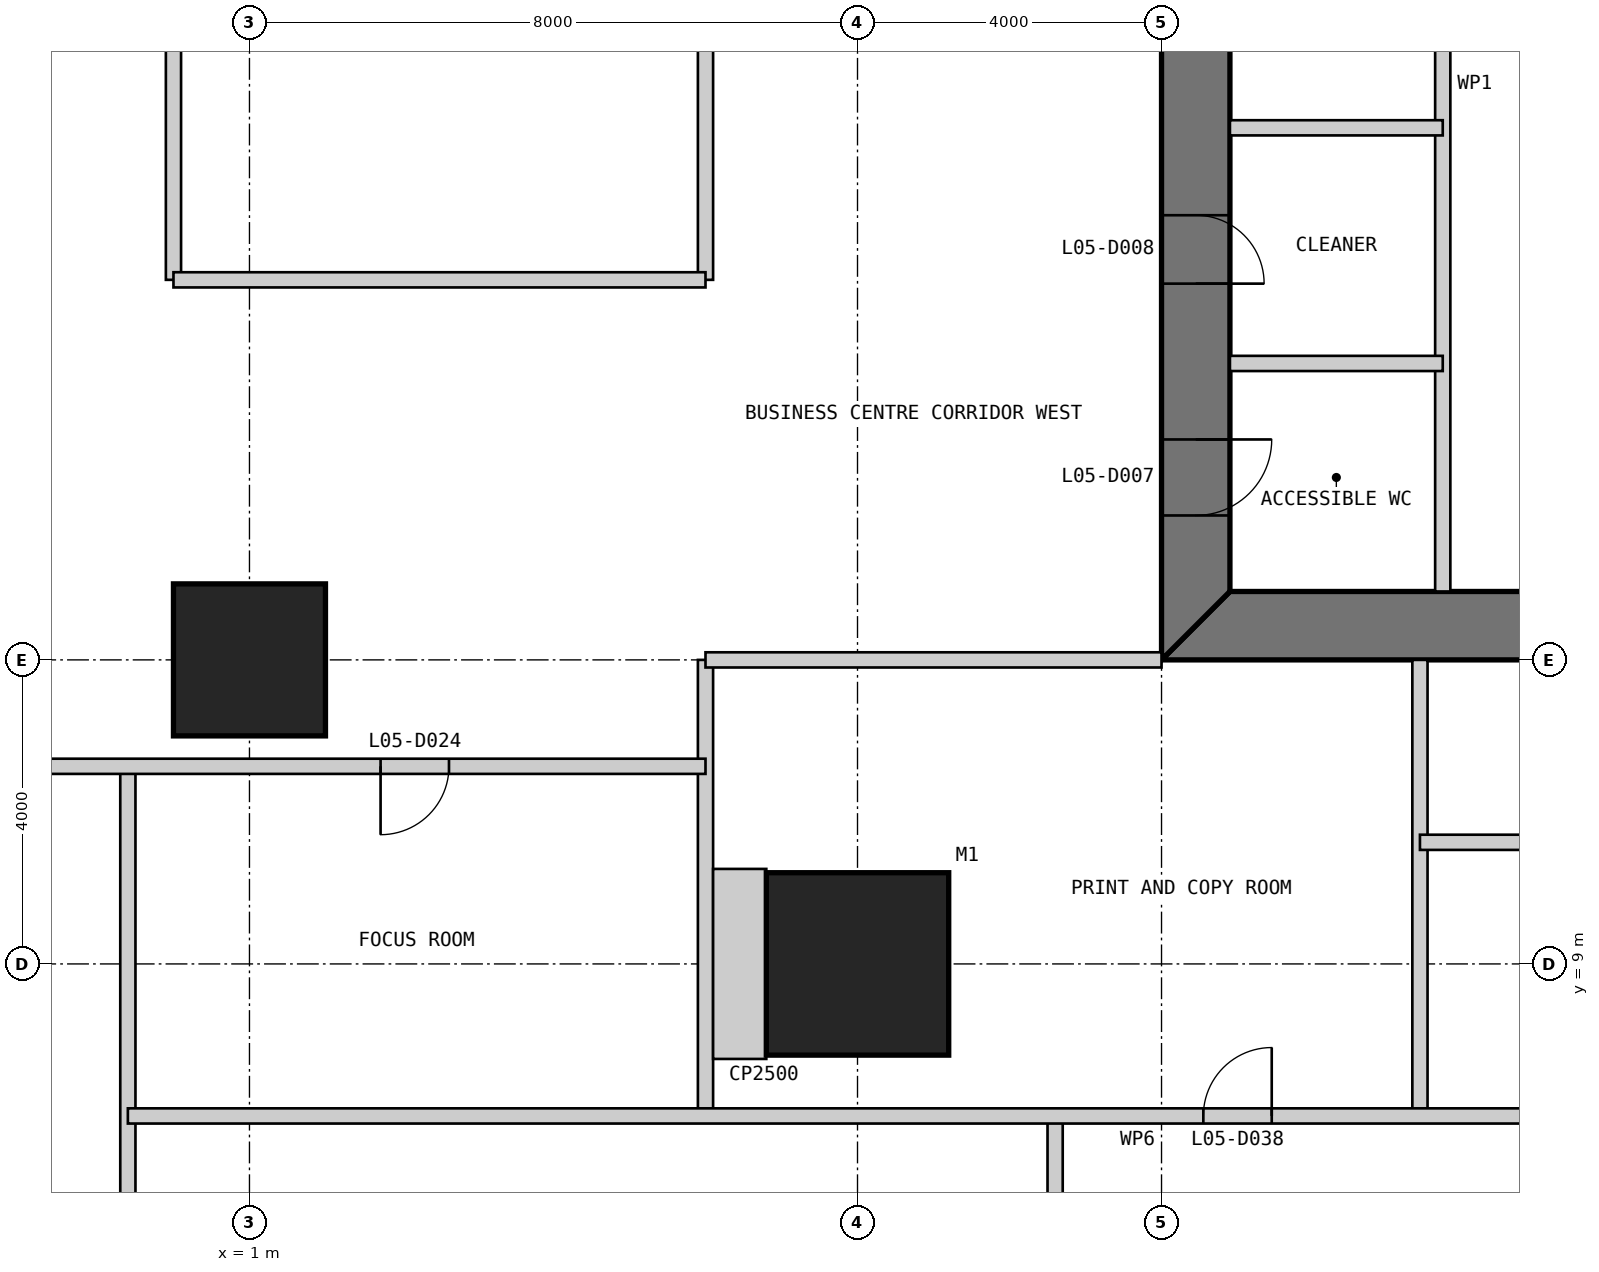
"""IFC4 building model, lengths in metres.
Left out: names, types, materials, properties, quantities, classifications, styles, units other than length and angle.
Written with IfcOpenShell. Run it as: python <this file> out.ifc"""

import sys

from ifc_helpers import new_model, si_unit, direction, frame, frame_2d, origin, origin_2d, place, context, subcontext, project, spatial, polyline, rectangle, outline, extrude, element, fill, save


model = new_model("IFC4")
c1 = context("Model", 3, precision=1e-05, world=origin(), true_north=direction((0.0, 1.0)))
c2 = subcontext(c1, "Body", "Model", "MODEL_VIEW")
j1 = project(units=[si_unit("LENGTHUNIT", "METRE"), si_unit("PLANEANGLEUNIT", "RADIAN")], contexts=[c1])
p1 = place(None, origin())
s1 = spatial("IfcSite", under=j1, at=p1, CompositionType="ELEMENT")
p2 = place(p1, origin())
s2 = spatial("IfcBuilding", under=s1, at=p2, CompositionType="ELEMENT")
p3 = place(p2, frame((0.0, 0.0, 26.2)))
s3 = spatial("IfcBuildingStorey", under=s2, at=p3, CompositionType="ELEMENT", Elevation=26.2)
p4 = place(p3, frame((9.0, 9.0, 0.0), z_axis=(0.0, 0.0, 1.0), x_axis=(1.0, 0.0, 0.0)))
e1 = element("IfcColumn", 1, at=p4, inside=s3, PredefinedType="COLUMN", context=c2, shape_type="SweptSolid", body=[
    extrude(rectangle(XDim=2.4, YDim=2.4, at=origin_2d()), origin(), (0.0, 0.0, 1.0), 4.8),
])
p5 = place(p3, frame((1.0, 13.0, 0.0), z_axis=(0.0, 0.0, 1.0), x_axis=(1.0, 0.0, 0.0)))
e2 = element("IfcColumn", 2, at=p5, inside=s3, PredefinedType="COLUMN", context=c2, shape_type="SweptSolid", body=[
    extrude(rectangle(XDim=2.0, YDim=2.0, at=origin_2d()), origin(), (0.0, 0.0, 1.0), 4.8),
])
p6 = place(p3, frame((13.0, 13.45, 0.0), z_axis=(0.0, 0.0, 1.0), x_axis=(1.0, 0.0, 0.0)))
e3 = element("IfcWall", 3, at=p6, inside=s3, PredefinedType="SHEAR", context=c2, shape_type="SweptSolid", body=[
    extrude(outline(polyline([(0.0, -0.45), (24.0, -0.45), (23.1, 0.45), (0.9, 0.45), (0.0, -0.45)])), origin(), (0.0, 0.0, 1.0), 4.8),
])
p7 = place(p6, frame((4.9, 0.0, 0.0)))
e4 = element("IfcOpeningElement", 4, at=p7, cuts=e3, PredefinedType="OPENING", context=c2, shape_type="SweptSolid", body=[
    extrude(rectangle(XDim=1.0, YDim=2.2, at=frame_2d((0.5, 1.1))), frame((0.0, 0.46, 0.0), z_axis=(0.0, -1.0, 0.0), x_axis=(1.0, 0.0, 0.0)), (0.0, 0.0, 1.0), 0.92),
])
p8 = place(p6, frame((8.9, 0.0, 0.0)))
e5 = element("IfcOpeningElement", 5, at=p8, cuts=e3, PredefinedType="OPENING", context=c2, shape_type="SweptSolid", body=[
    extrude(rectangle(XDim=1.1, YDim=2.2, at=frame_2d((0.55, 1.1))), frame((0.0, 0.46, 0.0), z_axis=(0.0, -1.0, 0.0), x_axis=(1.0, 0.0, 0.0)), (0.0, 0.0, 1.0), 0.92),
])
p9 = place(p6, frame((15.05, 0.0, 0.0)))
e6 = element("IfcOpeningElement", 6, at=p9, cuts=e3, PredefinedType="OPENING", context=c2, shape_type="SweptSolid", body=[
    extrude(rectangle(XDim=0.9, YDim=2.2, at=frame_2d((0.45, 1.1))), frame((0.0, 0.46, 0.0), z_axis=(0.0, -1.0, 0.0), x_axis=(1.0, 0.0, 0.0)), (0.0, 0.0, 1.0), 0.92),
])
p10 = place(p6, frame((17.9, 0.0, 0.0)))
e7 = element("IfcOpeningElement", 7, at=p10, cuts=e3, PredefinedType="OPENING", context=c2, shape_type="SweptSolid", body=[
    extrude(rectangle(XDim=1.0, YDim=2.2, at=frame_2d((0.5, 1.1))), frame((0.0, 0.46, 0.0), z_axis=(0.0, -1.0, 0.0), x_axis=(1.0, 0.0, 0.0)), (0.0, 0.0, 1.0), 0.92),
])
p11 = place(p6, frame((21.4, 0.0, 0.0)))
e8 = element("IfcOpeningElement", 8, at=p11, cuts=e3, PredefinedType="OPENING", context=c2, shape_type="SweptSolid", body=[
    extrude(rectangle(XDim=1.0, YDim=2.2, at=frame_2d((0.5, 1.1))), frame((0.0, 0.46, 0.0), z_axis=(0.0, -1.0, 0.0), x_axis=(1.0, 0.0, 0.0)), (0.0, 0.0, 1.0), 0.92),
])
p12 = place(p3, frame((13.45, 36.1, 0.0), z_axis=(0.0, 0.0, 1.0), x_axis=(0.0, -1.0, 0.0)))
e9 = element("IfcWall", 9, at=p12, inside=s3, PredefinedType="SHEAR", context=c2, shape_type="SweptSolid", body=[
    extrude(outline(polyline([(-0.9, -0.45), (23.1, -0.45), (22.2, 0.45), (0.0, 0.45), (-0.9, -0.45)])), origin(), (0.0, 0.0, 1.0), 4.8),
])
p13 = place(p12, frame((20.2, 0.0, 0.0)))
e10 = element("IfcOpeningElement", 10, at=p13, cuts=e9, PredefinedType="OPENING", context=c2, shape_type="SweptSolid", body=[
    extrude(rectangle(XDim=1.0, YDim=2.2, at=frame_2d((0.5, 1.1))), frame((0.0, 0.46, 0.0), z_axis=(0.0, -1.0, 0.0), x_axis=(1.0, 0.0, 0.0)), (0.0, 0.0, 1.0), 0.92),
])
p14 = place(p12, frame((17.25, 0.0, 0.0)))
e11 = element("IfcOpeningElement", 11, at=p14, cuts=e9, PredefinedType="OPENING", context=c2, shape_type="SweptSolid", body=[
    extrude(rectangle(XDim=0.9, YDim=2.2, at=frame_2d((0.45, 1.1))), frame((0.0, 0.46, 0.0), z_axis=(0.0, -1.0, 0.0), x_axis=(1.0, 0.0, 0.0)), (0.0, 0.0, 1.0), 0.92),
])
p15 = place(p3, frame((16.7, 13.9, 0.0), z_axis=(0.0, 0.0, 1.0), x_axis=(0.0, 1.0, 0.0)))
e12 = element("IfcWall", 12, at=p15, inside=s3, PredefinedType="PARTITIONING", context=c2, shape_type="SweptSolid", body=[
    extrude(rectangle(XDim=16.1, YDim=0.2, at=frame_2d((8.05, 0.0))), origin(), (0.0, 0.0, 1.0), 4.6),
])
for number, where, z_axis, x_axis in (
    (13, (13.9, 20.0, 0.0), (0.0, 0.0, 1.0), (1.0, 0.0, 0.0)),
    (14, (13.9, 16.9, 0.0), (0.0, 0.0, 1.0), (1.0, 0.0, 0.0)),
):
    element("IfcWall", number, at=place(p3, frame(where, z_axis=z_axis, x_axis=x_axis)), inside=s3, PredefinedType="PARTITIONING", context=c2, shape_type="SweptSolid", body=[
        extrude(rectangle(XDim=2.8, YDim=0.2, at=frame_2d((1.4, 0.0))), origin(), (0.0, 0.0, 1.0), 4.6),
    ])
p16 = place(p3, frame((-0.6, -7.25, 0.0), z_axis=(0.0, 0.0, 1.0), x_axis=(0.0, 1.0, 0.0)))
e15 = element("IfcWall", 15, at=p16, inside=s3, PredefinedType="PARTITIONING", context=c2, shape_type="SweptSolid", body=[
    extrude(rectangle(XDim=18.85, YDim=0.2, at=frame_2d((9.425, 0.0))), origin(), (0.0, 0.0, 1.0), 4.5),
])
p17 = place(p3, frame((0.0, 18.0, 0.0), z_axis=(0.0, 0.0, 1.0), x_axis=(0.0, 1.0, 0.0)))
e16 = element("IfcWall", 16, at=p17, inside=s3, PredefinedType="PARTITIONING", context=c2, shape_type="SweptSolid", body=[
    extrude(rectangle(XDim=8.0, YDim=0.2, at=frame_2d((4.0, 0.0))), origin(), (0.0, 0.0, 1.0), 4.5),
])
p18 = place(p17, frame((3.55, 0.0, 0.0)))
e17 = element("IfcOpeningElement", 17, at=p18, cuts=e16, PredefinedType="OPENING", context=c2, shape_type="SweptSolid", body=[
    extrude(rectangle(XDim=0.9, YDim=2.2, at=frame_2d((0.45, 1.1))), frame((0.0, 0.11, 0.0), z_axis=(0.0, -1.0, 0.0), x_axis=(1.0, 0.0, 0.0)), (0.0, 0.0, 1.0), 0.22),
])
p19 = place(p3, frame((7.0, 7.0, 0.0), z_axis=(0.0, 0.0, 1.0), x_axis=(0.0, 1.0, 0.0)))
e18 = element("IfcWall", 18, at=p19, inside=s3, PredefinedType="PARTITIONING", context=c2, shape_type="SweptSolid", body=[
    extrude(rectangle(XDim=6.0, YDim=0.2, at=frame_2d((3.0, 0.0))), origin(), (0.0, 0.0, 1.0), 4.5),
])
p20 = place(p3, frame((7.0, 18.0, 0.0), z_axis=(0.0, 0.0, 1.0), x_axis=(0.0, 1.0, 0.0)))
e19 = element("IfcWall", 19, at=p20, inside=s3, PredefinedType="PARTITIONING", context=c2, shape_type="SweptSolid", body=[
    extrude(rectangle(XDim=25.0, YDim=0.2, at=frame_2d((12.5, 0.0))), origin(), (0.0, 0.0, 1.0), 3.893),
])
p21 = place(p3, frame((11.6, -7.25, 0.0), z_axis=(0.0, 0.0, 1.0), x_axis=(0.0, 1.0, 0.0)))
e20 = element("IfcWall", 20, at=p21, inside=s3, PredefinedType="PARTITIONING", context=c2, shape_type="SweptSolid", body=[
    extrude(rectangle(XDim=14.25, YDim=0.2, at=frame_2d((7.125, 0.0))), origin(), (0.0, 0.0, 1.0), 4.5),
])
p22 = place(p21, frame((5.225, 0.0, 0.0)))
e21 = element("IfcOpeningElement", 21, at=p22, cuts=e20, PredefinedType="OPENING", context=c2, shape_type="SweptSolid", body=[
    extrude(rectangle(XDim=1.8, YDim=2.4, at=frame_2d((0.9, 1.2))), frame((0.0, 0.11, 0.0), z_axis=(0.0, -1.0, 0.0), x_axis=(1.0, 0.0, 0.0)), (0.0, 0.0, 1.0), 0.22),
])
p23 = place(p3, frame((16.4, 7.0, 0.0), z_axis=(0.0, 0.0, 1.0), x_axis=(0.0, 1.0, 0.0)))
e22 = element("IfcWall", 22, at=p23, inside=s3, PredefinedType="PARTITIONING", context=c2, shape_type="SweptSolid", body=[
    extrude(rectangle(XDim=6.0, YDim=0.2, at=frame_2d((3.0, 0.0))), origin(), (0.0, 0.0, 1.0), 4.5),
])
p24 = place(p3, frame((-0.6, 7.0, 0.0), z_axis=(0.0, 0.0, 1.0), x_axis=(1.0, 0.0, 0.0)))
e23 = element("IfcWall", 23, at=p24, inside=s3, PredefinedType="PARTITIONING", context=c2, shape_type="SweptSolid", body=[
    extrude(rectangle(XDim=34.6, YDim=0.2, at=frame_2d((17.3, 0.0))), origin(), (0.0, 0.0, 1.0), 4.5),
])
p25 = place(p24, frame((14.15, 0.0, 0.0)))
e24 = element("IfcOpeningElement", 24, at=p25, cuts=e23, PredefinedType="OPENING", context=c2, shape_type="SweptSolid", body=[
    extrude(rectangle(XDim=0.9, YDim=2.2, at=frame_2d((0.45, 1.1))), frame((0.0, 0.11, 0.0), z_axis=(0.0, -1.0, 0.0), x_axis=(1.0, 0.0, 0.0)), (0.0, 0.0, 1.0), 0.22),
])
p26 = place(p3, frame((16.4, 10.6, 0.0), z_axis=(0.0, 0.0, 1.0), x_axis=(1.0, 0.0, 0.0)))
e25 = element("IfcWall", 25, at=p26, inside=s3, PredefinedType="PARTITIONING", context=c2, shape_type="SweptSolid", body=[
    extrude(rectangle(XDim=17.6, YDim=0.2, at=frame_2d((8.8, 0.0))), origin(), (0.0, 0.0, 1.0), 4.5),
])
p27 = place(p26, frame((8.65, 0.0, 0.0)))
e26 = element("IfcOpeningElement", 26, at=p27, cuts=e25, PredefinedType="OPENING", context=c2, shape_type="SweptSolid", body=[
    extrude(rectangle(XDim=1.8, YDim=2.4, at=frame_2d((0.9, 1.2))), frame((0.0, 0.11, 0.0), z_axis=(0.0, -1.0, 0.0), x_axis=(1.0, 0.0, 0.0)), (0.0, 0.0, 1.0), 0.22),
])
p28 = place(p3, frame((-7.25, 11.6, 0.0), z_axis=(0.0, 0.0, 1.0), x_axis=(1.0, 0.0, 0.0)))
e27 = element("IfcWall", 27, at=p28, inside=s3, PredefinedType="PARTITIONING", context=c2, shape_type="SweptSolid", body=[
    extrude(rectangle(XDim=14.25, YDim=0.2, at=frame_2d((7.125, 0.0))), origin(), (0.0, 0.0, 1.0), 4.5),
])
p29 = place(p28, frame((2.45, 0.0, 0.0)))
e28 = element("IfcOpeningElement", 28, at=p29, cuts=e27, PredefinedType="OPENING", context=c2, shape_type="SweptSolid", body=[
    extrude(rectangle(XDim=1.8, YDim=2.4, at=frame_2d((0.9, 1.2))), frame((0.0, 0.11, 0.0), z_axis=(0.0, -1.0, 0.0), x_axis=(1.0, 0.0, 0.0)), (0.0, 0.0, 1.0), 0.22),
])
p30 = place(p28, frame((9.975, 0.0, 0.0)))
e29 = element("IfcOpeningElement", 29, at=p30, cuts=e27, PredefinedType="OPENING", context=c2, shape_type="SweptSolid", body=[
    extrude(rectangle(XDim=0.9, YDim=2.2, at=frame_2d((0.45, 1.1))), frame((0.0, 0.11, 0.0), z_axis=(0.0, -1.0, 0.0), x_axis=(1.0, 0.0, 0.0)), (0.0, 0.0, 1.0), 0.22),
])
p31 = place(p3, frame((7.0, 13.0, 0.0), z_axis=(0.0, 0.0, 1.0), x_axis=(1.0, 0.0, 0.0)))
e30 = element("IfcWall", 30, at=p31, inside=s3, PredefinedType="PARTITIONING", context=c2, shape_type="SweptSolid", body=[
    extrude(rectangle(XDim=6.0, YDim=0.2, at=frame_2d((3.0, 0.0))), origin(), (0.0, 0.0, 1.0), 3.703),
])
p32 = place(p3, frame((0.0, 18.0, 0.0), z_axis=(0.0, 0.0, 1.0), x_axis=(1.0, 0.0, 0.0)))
e31 = element("IfcWall", 31, at=p32, inside=s3, PredefinedType="PARTITIONING", context=c2, shape_type="SweptSolid", body=[
    extrude(rectangle(XDim=7.0, YDim=0.2, at=frame_2d((3.5, 0.0))), origin(), (0.0, 0.0, 1.0), 4.5),
])
p33 = place(p3, frame((7.1, 9.0, 0.0), z_axis=(0.0, 0.0, 1.0), x_axis=(1.0, 0.0, 0.0)))
e32 = element("IfcWall", 32, at=p33, inside=s3, PredefinedType="PARTITIONING", context=c2, shape_type="SweptSolid", body=[
    extrude(rectangle(XDim=0.7, YDim=2.5, at=frame_2d((0.35, 0.0))), origin(), (0.0, 0.0, 1.0), 4.5),
])
p34 = place(p13, origin())
e33 = element("IfcDoor", 33, at=p34, inside=s3, OperationType="SINGLE_SWING_LEFT", PredefinedType="DOOR", context=c2, shape_type="SweptSolid", body=[
    extrude(rectangle(XDim=1.0, YDim=2.2, at=frame_2d((0.5, 1.1))), frame((0.0, 0.025, 0.0), z_axis=(0.0, -1.0, 0.0), x_axis=(1.0, 0.0, 0.0)), (0.0, 0.0, 1.0), 0.05),
    extrude(outline(polyline([(0.0, 0.0), (0.04, 0.0), (0.04, 2.16), (0.96, 2.16), (0.96, 0.0), (1.0, 0.0), (1.0, 2.2), (0.0, 2.2), (0.0, 0.0)])), frame((0.0, 0.3, 0.0), z_axis=(0.0, -1.0, 0.0), x_axis=(1.0, 0.0, 0.0)), (0.0, 0.0, 1.0), 0.6),
])
fill(e10, e33)
p35 = place(p14, origin())
e34 = element("IfcDoor", 34, at=p35, inside=s3, OperationType="SINGLE_SWING_RIGHT", PredefinedType="DOOR", context=c2, shape_type="SweptSolid", body=[
    extrude(rectangle(XDim=0.9, YDim=2.2, at=frame_2d((0.45, 1.1))), frame((0.0, 0.025, 0.0), z_axis=(0.0, -1.0, 0.0), x_axis=(1.0, 0.0, 0.0)), (0.0, 0.0, 1.0), 0.05),
    extrude(outline(polyline([(0.0, 0.0), (0.04, 0.0), (0.04, 2.16), (0.86, 2.16), (0.86, 0.0), (0.9, 0.0), (0.9, 2.2), (0.0, 2.2), (0.0, 0.0)])), frame((0.0, 0.3, 0.0), z_axis=(0.0, -1.0, 0.0), x_axis=(1.0, 0.0, 0.0)), (0.0, 0.0, 1.0), 0.6),
])
fill(e11, e34)
p36 = place(p30, frame((0.9, 0.0, 0.0), z_axis=(0.0, 0.0, 1.0), x_axis=(-1.0, 0.0, 0.0)))
e35 = element("IfcDoor", 35, at=p36, inside=s3, OperationType="SINGLE_SWING_RIGHT", PredefinedType="DOOR", context=c2, shape_type="SweptSolid", body=[
    extrude(rectangle(XDim=0.9, YDim=2.2, at=frame_2d((0.45, 1.1))), frame((0.0, 0.025, 0.0), z_axis=(0.0, -1.0, 0.0), x_axis=(1.0, 0.0, 0.0)), (0.0, 0.0, 1.0), 0.05),
])
fill(e29, e35)
p37 = place(p25, origin())
e36 = element("IfcDoor", 36, at=p37, inside=s3, OperationType="SINGLE_SWING_RIGHT", PredefinedType="DOOR", context=c2, shape_type="SweptSolid", body=[
    extrude(rectangle(XDim=0.9, YDim=2.2, at=frame_2d((0.45, 1.1))), frame((0.0, 0.025, 0.0), z_axis=(0.0, -1.0, 0.0), x_axis=(1.0, 0.0, 0.0)), (0.0, 0.0, 1.0), 0.05),
])
fill(e24, e36)
save(model, sys.argv[1])
